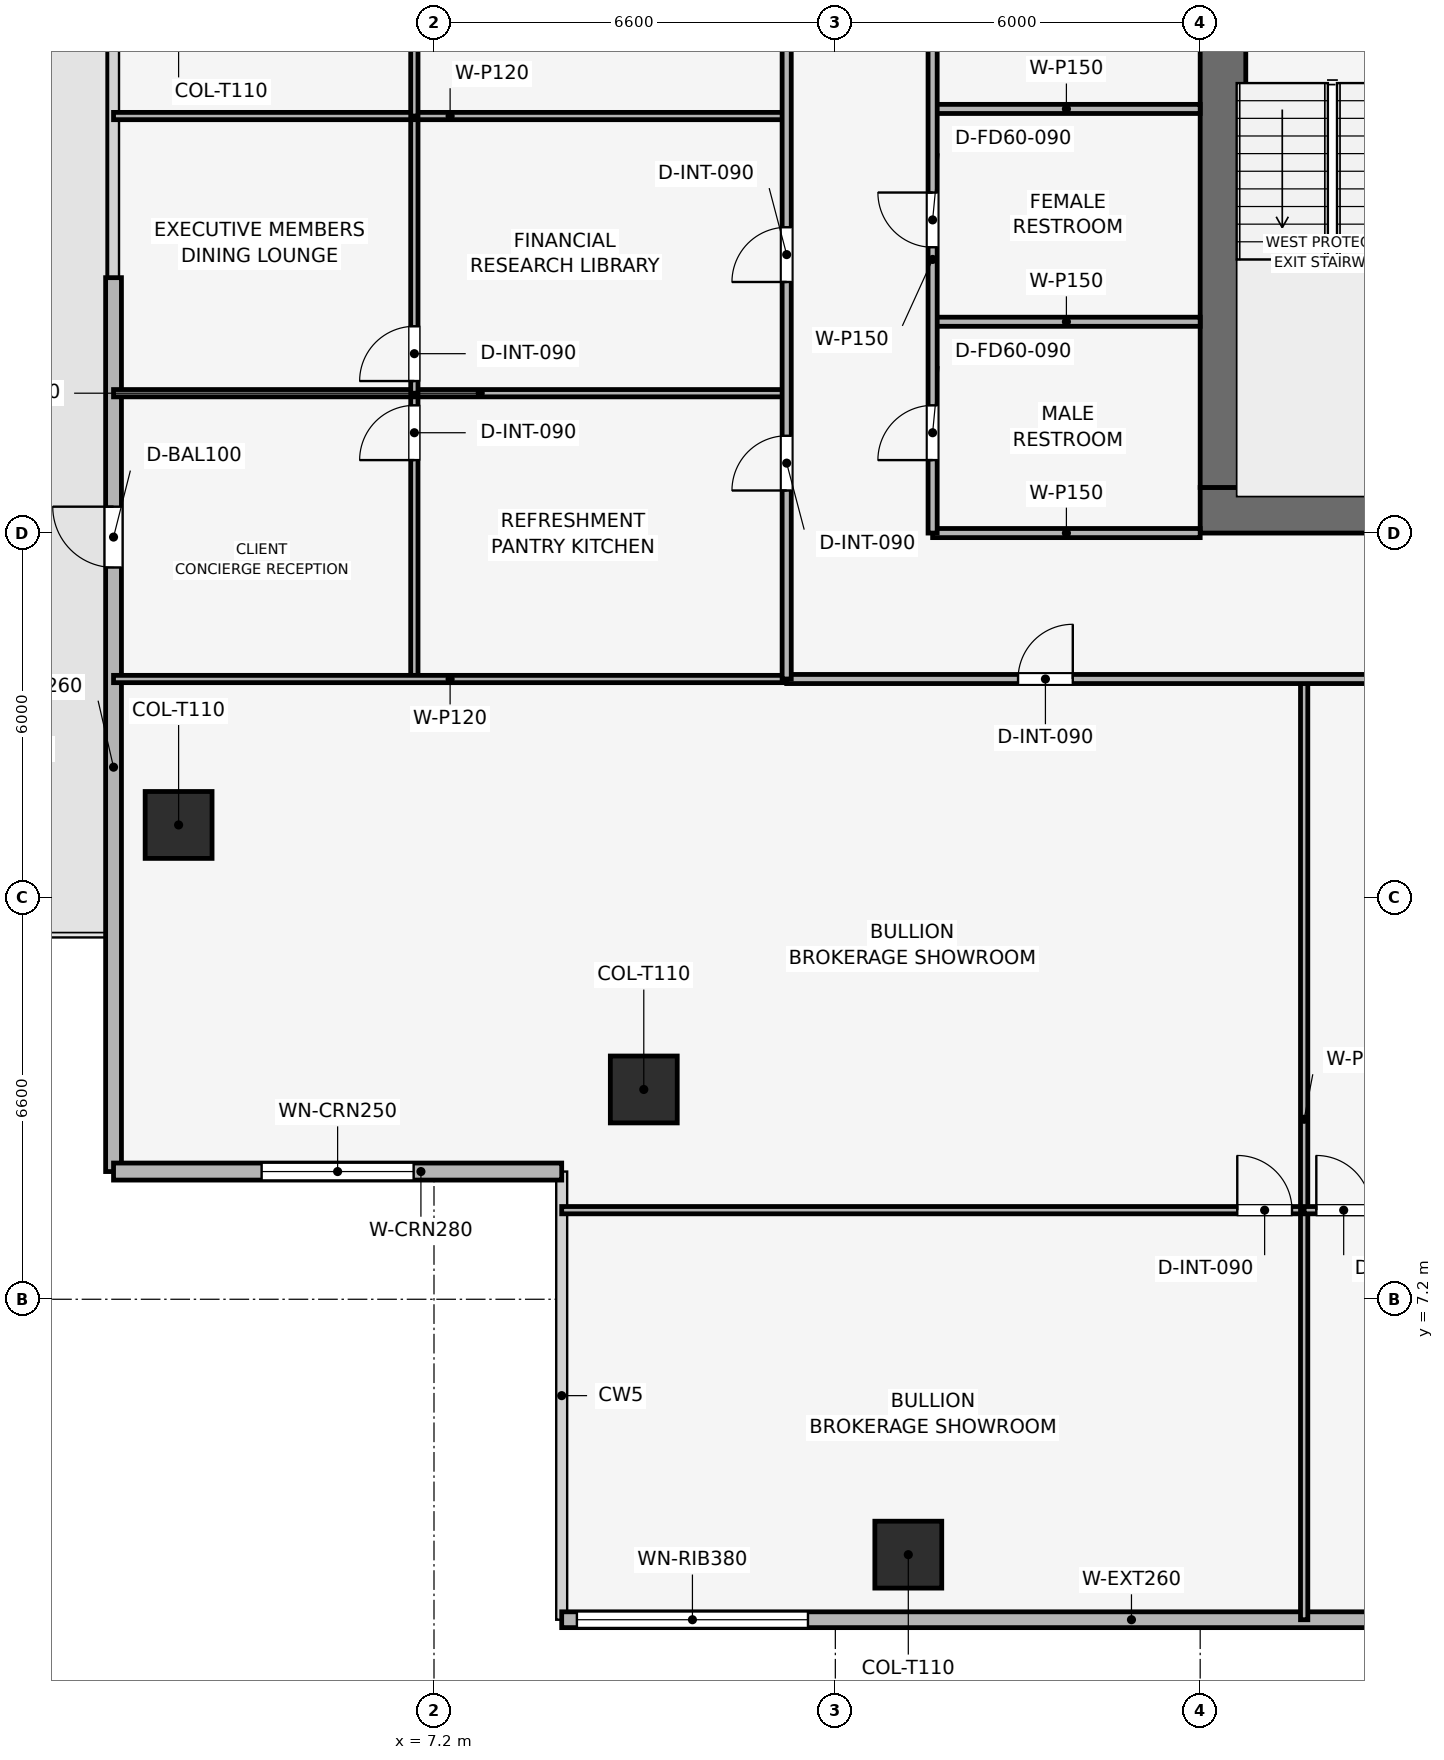
"""IFC4 building model, lengths in metres.
Left out: names, types, materials, properties, quantities, classifications, styles, units other than length and angle.
Written with IfcOpenShell. Run it as: python <this file> out.ifc"""

import sys

from ifc_helpers import new_model, si_unit, direction, frame, frame_2d, origin, origin_2d, place, context, subcontext, project, spatial, rectangle, extrude, element, fill, save


model = new_model("IFC4")
c1 = context("Model", 3, precision=1e-05, world=origin(), true_north=direction((0.0, 1.0)))
c2 = subcontext(c1, "Body", "Model", "MODEL_VIEW")
j1 = project(units=[si_unit("LENGTHUNIT", "METRE"), si_unit("PLANEANGLEUNIT", "RADIAN")], contexts=[c1])
p1 = place(None, origin())
s1 = spatial("IfcSite", under=j1, at=p1, CompositionType="ELEMENT")
p2 = place(p1, origin())
s2 = spatial("IfcBuilding", under=s1, at=p2, CompositionType="ELEMENT")
p3 = place(p2, frame((0.0, 0.0, 199.95)))
s3 = spatial("IfcBuildingStorey", under=s2, at=p3, CompositionType="ELEMENT", Elevation=199.95)
p4 = place(p3, frame((19.8, 20.175, 0.0), z_axis=(0.0, 0.0, 1.0), x_axis=(1.0, 0.0, 0.0)))
e1 = element("IfcWall", 1, at=p4, inside=s3, PredefinedType="SHEAR", context=c2, shape_type="SweptSolid", body=[
    extrude(rectangle(XDim=18.0, YDim=0.75, at=frame_2d((9.0, 0.0))), origin(), (0.0, 0.0, 1.0), 3.75),
])
p5 = place(p4, frame((8.4, 0.0, 0.0)))
e2 = element("IfcOpeningElement", 2, at=p5, cuts=e1, PredefinedType="OPENING", context=c2, shape_type="SweptSolid", body=[
    extrude(rectangle(XDim=1.2, YDim=2.2, at=frame_2d((0.6, 1.1))), frame((0.0, 0.385, 0.0), z_axis=(0.0, -1.0, 0.0), x_axis=(1.0, 0.0, 0.0)), (0.0, 0.0, 1.0), 0.77),
])
p6 = place(p3, frame((20.175, 20.55, 0.0), z_axis=(0.0, 0.0, 1.0), x_axis=(0.0, 1.0, 0.0)))
e3 = element("IfcWall", 3, at=p6, inside=s3, PredefinedType="SHEAR", context=c2, shape_type="SweptSolid", body=[
    extrude(rectangle(XDim=16.5, YDim=0.75, at=frame_2d((8.25, 0.0))), origin(), (0.0, 0.0, 1.0), 3.75),
])
p7 = place(p6, frame((10.25, 0.0, 0.0)))
e4 = element("IfcOpeningElement", 4, at=p7, cuts=e3, PredefinedType="OPENING", context=c2, shape_type="SweptSolid", body=[
    extrude(rectangle(XDim=1.1, YDim=2.15, at=frame_2d((0.55, 1.075))), frame((0.0, 0.385, 0.0), z_axis=(0.0, -1.0, 0.0), x_axis=(1.0, 0.0, 0.0)), (0.0, 0.0, 1.0), 0.77),
])
for number, where, z_axis, x_axis in (
    (5, (15.0, 3.0, 0.003), (0.0, 0.0, 1.0), (1.0, 0.0, 0.0)),
    (6, (3.0, 15.0, 0.003), (0.0, 0.0, 1.0), (1.0, 0.0, 0.0)),
    (7, (10.65, 10.65, 0.003), (0.0, 0.0, 1.0), (1.0, 0.0, 0.0)),
):
    element("IfcColumn", number, at=place(p3, frame(where, z_axis=z_axis, x_axis=x_axis)), inside=s3, PredefinedType="COLUMN", context=c2, shape_type="SweptSolid", body=[
        extrude(rectangle(XDim=1.1, YDim=1.1, at=origin_2d()), origin(), (0.0, 0.0, 1.0), 3.494),
    ])
p8 = place(p3, frame((24.0, 1.93, 0.0), z_axis=(0.0, 0.0, 1.0), x_axis=(-1.0, 0.0, 0.0)))
e8 = element("IfcWall", 8, at=p8, inside=s3, PredefinedType="SOLIDWALL", context=c2, shape_type="SweptSolid", body=[
    extrude(rectangle(XDim=14.7, YDim=0.26, at=frame_2d((7.35, 0.0))), origin(), (0.0, 0.0, 1.0), 3.5),
])
p9 = place(p8, frame((10.65, 0.0, 0.9)))
e9 = element("IfcOpeningElement", 9, at=p9, cuts=e8, PredefinedType="OPENING", context=c2, shape_type="SweptSolid", body=[
    extrude(rectangle(XDim=3.8, YDim=1.9, at=frame_2d((1.9, 0.95))), frame((0.0, 0.14, 0.0), z_axis=(0.0, -1.0, 0.0), x_axis=(1.0, 0.0, 0.0)), (0.0, 0.0, 1.0), 0.28),
])
p10 = place(p3, frame((1.93, 9.3, 0.0), z_axis=(0.0, 0.0, 1.0), x_axis=(0.0, 1.0, 0.0)))
e10 = element("IfcWall", 10, at=p10, inside=s3, PredefinedType="SOLIDWALL", context=c2, shape_type="SweptSolid", body=[
    extrude(rectangle(XDim=14.7, YDim=0.26, at=frame_2d((7.35, 0.0))), origin(), (0.0, 0.0, 1.0), 3.5),
])
p11 = place(p10, frame((9.934, 0.0, 0.0)))
e11 = element("IfcOpeningElement", 11, at=p11, cuts=e10, PredefinedType="OPENING", context=c2, shape_type="SweptSolid", body=[
    extrude(rectangle(XDim=1.0, YDim=2.2, at=frame_2d((0.5, 1.1))), frame((0.0, 0.14, 0.0), z_axis=(0.0, -1.0, 0.0), x_axis=(1.0, 0.0, 0.0)), (0.0, 0.0, 1.0), 0.28),
])
p12 = place(p3, frame((9.3, 9.3, 0.0), z_axis=(0.0, 0.0, 1.0), x_axis=(-1.0, 0.0, 0.0)))
e12 = element("IfcWall", 12, at=p12, inside=s3, PredefinedType="SOLIDWALL", context=c2, shape_type="SweptSolid", body=[
    extrude(rectangle(XDim=7.37, YDim=0.28, at=frame_2d((3.685, 0.0))), origin(), (0.0, 0.0, 1.0), 3.5),
])
p13 = place(p12, frame((2.435, 0.0, 0.9)))
e13 = element("IfcOpeningElement", 13, at=p13, cuts=e12, PredefinedType="OPENING", context=c2, shape_type="SweptSolid", body=[
    extrude(rectangle(XDim=2.5, YDim=1.9, at=frame_2d((1.25, 0.95))), frame((0.0, 0.15, 0.0), z_axis=(0.0, -1.0, 0.0), x_axis=(1.0, 0.0, 0.0)), (0.0, 0.0, 1.0), 0.3),
])
p14 = place(p3, frame((15.4, 19.8, 0.0), z_axis=(0.0, 0.0, 1.0), x_axis=(1.0, 0.0, 0.0)))
e14 = element("IfcWall", 14, at=p14, inside=s3, PredefinedType="PARTITIONING", context=c2, shape_type="SweptSolid", body=[
    extrude(rectangle(XDim=4.4, YDim=0.15, at=frame_2d((2.2, 0.0))), origin(), (0.0, 0.0, 1.0), 3.035),
])
for number, where, z_axis, x_axis in (
    (15, (15.4, 23.275, 0.0), (0.0, 0.0, 1.0), (1.0, 0.0, 0.0)),
    (16, (15.4, 26.775, 0.0), (0.0, 0.0, 1.0), (1.0, 0.0, 0.0)),
):
    element("IfcWall", number, at=place(p3, frame(where, z_axis=z_axis, x_axis=x_axis)), inside=s3, PredefinedType="PARTITIONING", context=c2, shape_type="SweptSolid", body=[
        extrude(rectangle(XDim=4.4, YDim=0.15, at=frame_2d((2.2, 0.0))), origin(), (0.0, 0.0, 1.0), 3.5),
    ])
p15 = place(p3, frame((15.4, 19.8, 0.0), z_axis=(0.0, 0.0, 1.0), x_axis=(0.0, 1.0, 0.0)))
e17 = element("IfcWall", 17, at=p15, inside=s3, PredefinedType="PARTITIONING", context=c2, shape_type="SweptSolid", body=[
    extrude(rectangle(XDim=10.35, YDim=0.15, at=frame_2d((5.175, 0.0))), origin(), (0.0, 0.0, 1.0), 3.035),
])
p16 = place(p15, frame((1.2, 0.0, 0.0)))
e18 = element("IfcOpeningElement", 18, at=p16, cuts=e17, PredefinedType="OPENING", context=c2, shape_type="SweptSolid", body=[
    extrude(rectangle(XDim=0.9, YDim=2.1, at=frame_2d((0.45, 1.05))), frame((0.0, 0.085, 0.0), z_axis=(0.0, -1.0, 0.0), x_axis=(1.0, 0.0, 0.0)), (0.0, 0.0, 1.0), 0.17),
])
p17 = place(p15, frame((4.7, 0.0, 0.0)))
e19 = element("IfcOpeningElement", 19, at=p17, cuts=e17, PredefinedType="OPENING", context=c2, shape_type="SweptSolid", body=[
    extrude(rectangle(XDim=0.9, YDim=2.1, at=frame_2d((0.45, 1.05))), frame((0.0, 0.085, 0.0), z_axis=(0.0, -1.0, 0.0), x_axis=(1.0, 0.0, 0.0)), (0.0, 0.0, 1.0), 0.17),
])
p18 = place(p15, frame((8.1, 0.0, 0.0)))
e20 = element("IfcOpeningElement", 20, at=p18, cuts=e17, PredefinedType="OPENING", context=c2, shape_type="SweptSolid", body=[
    extrude(rectangle(XDim=0.95, YDim=2.1, at=frame_2d((0.475, 1.05))), frame((0.0, 0.085, 0.0), z_axis=(0.0, -1.0, 0.0), x_axis=(1.0, 0.0, 0.0)), (0.0, 0.0, 1.0), 0.17),
])
p19 = place(p3, frame((9.3, 8.665, 0.0), z_axis=(0.0, 0.0, 1.0), x_axis=(1.0, 0.0, 0.0)))
e21 = element("IfcWall", 21, at=p19, inside=s3, PredefinedType="PARTITIONING", context=c2, shape_type="SweptSolid", body=[
    extrude(rectangle(XDim=12.21, YDim=0.12, at=frame_2d((6.105, 0.0))), origin(), (0.0, 0.0, 1.0), 2.885),
])
p20 = place(p19, frame((11.11, 0.0, 0.0)))
e22 = element("IfcOpeningElement", 22, at=p20, cuts=e21, PredefinedType="OPENING", context=c2, shape_type="SweptSolid", body=[
    extrude(rectangle(XDim=0.9, YDim=2.1, at=frame_2d((0.45, 1.05))), frame((0.0, 0.07, 0.0), z_axis=(0.0, -1.0, 0.0), x_axis=(1.0, 0.0, 0.0)), (0.0, 0.0, 1.0), 0.14),
])
p21 = place(p3, frame((21.51, 1.93, 0.0), z_axis=(0.0, 0.0, 1.0), x_axis=(0.0, 1.0, 0.0)))
e23 = element("IfcWall", 23, at=p21, inside=s3, PredefinedType="PARTITIONING", context=c2, shape_type="SweptSolid", body=[
    extrude(rectangle(XDim=15.47, YDim=0.12, at=frame_2d((7.735, 0.0))), origin(), (0.0, 0.0, 1.0), 2.885),
])
p22 = place(p3, frame((21.51, 8.665, 0.0), z_axis=(0.0, 0.0, 1.0), x_axis=(1.0, 0.0, 0.0)))
e24 = element("IfcWall", 24, at=p22, inside=s3, PredefinedType="PARTITIONING", context=c2, shape_type="SweptSolid", body=[
    extrude(rectangle(XDim=26.79, YDim=0.12, at=frame_2d((13.395, 0.0))), origin(), (0.0, 0.0, 1.0), 2.885),
])
p23 = place(p22, frame((0.2, 0.0, 0.0)))
e25 = element("IfcOpeningElement", 25, at=p23, cuts=e24, PredefinedType="OPENING", context=c2, shape_type="SweptSolid", body=[
    extrude(rectangle(XDim=0.9, YDim=2.1, at=frame_2d((0.45, 1.05))), frame((0.0, 0.07, 0.0), z_axis=(0.0, -1.0, 0.0), x_axis=(1.0, 0.0, 0.0)), (0.0, 0.0, 1.0), 0.14),
])
p24 = place(p3, frame((6.877, 17.4, 0.0), z_axis=(0.0, 0.0, 1.0), x_axis=(0.0, 1.0, 0.0)))
e26 = element("IfcWall", 26, at=p24, inside=s3, PredefinedType="PARTITIONING", context=c2, shape_type="SweptSolid", body=[
    extrude(rectangle(XDim=4.7, YDim=0.12, at=frame_2d((2.35, 0.0))), origin(), (0.0, 0.0, 1.0), 3.035),
])
p25 = place(p24, frame((3.6, 0.0, 0.0)))
e27 = element("IfcOpeningElement", 27, at=p25, cuts=e26, PredefinedType="OPENING", context=c2, shape_type="SweptSolid", body=[
    extrude(rectangle(XDim=0.9, YDim=2.1, at=frame_2d((0.45, 1.05))), frame((0.0, 0.07, 0.0), z_axis=(0.0, -1.0, 0.0), x_axis=(1.0, 0.0, 0.0)), (0.0, 0.0, 1.0), 0.14),
])
p26 = place(p3, frame((1.93, 22.1, 0.0), z_axis=(0.0, 0.0, 1.0), x_axis=(1.0, 0.0, 0.0)))
e28 = element("IfcWall", 28, at=p26, inside=s3, PredefinedType="PARTITIONING", context=c2, shape_type="SweptSolid", body=[
    extrude(rectangle(XDim=11.07, YDim=0.12, at=frame_2d((5.535, 0.0))), origin(), (0.0, 0.0, 1.0), 2.885),
])
p27 = place(p3, frame((6.877, 22.1, 0.0), z_axis=(0.0, 0.0, 1.0), x_axis=(0.0, 1.0, 0.0)))
e29 = element("IfcWall", 29, at=p27, inside=s3, PredefinedType="PARTITIONING", context=c2, shape_type="SweptSolid", body=[
    extrude(rectangle(XDim=4.558, YDim=0.12, at=frame_2d((2.279, 0.0))), origin(), (0.0, 0.0, 1.0), 3.5),
])
p28 = place(p27, frame((0.2, 0.0, 0.0)))
e30 = element("IfcOpeningElement", 30, at=p28, cuts=e29, PredefinedType="OPENING", context=c2, shape_type="SweptSolid", body=[
    extrude(rectangle(XDim=0.9, YDim=2.1, at=frame_2d((0.45, 1.05))), frame((0.0, 0.07, 0.0), z_axis=(0.0, -1.0, 0.0), x_axis=(1.0, 0.0, 0.0)), (0.0, 0.0, 1.0), 0.14),
])
p29 = place(p3, frame((1.93, 26.658, 0.0), z_axis=(0.0, 0.0, 1.0), x_axis=(1.0, 0.0, 0.0)))
e31 = element("IfcWall", 31, at=p29, inside=s3, PredefinedType="PARTITIONING", context=c2, shape_type="SweptSolid", body=[
    extrude(rectangle(XDim=11.07, YDim=0.12, at=frame_2d((5.535, 0.0))), origin(), (0.0, 0.0, 1.0), 2.885),
])
p30 = place(p3, frame((6.877, 26.658, 0.0), z_axis=(0.0, 0.0, 1.0), x_axis=(0.0, 1.0, 0.0)))
e32 = element("IfcWall", 32, at=p30, inside=s3, PredefinedType="PARTITIONING", context=c2, shape_type="SweptSolid", body=[
    extrude(rectangle(XDim=4.297, YDim=0.12, at=frame_2d((2.148, 0.0))), origin(), (0.0, 0.0, 1.0), 3.035),
])
p31 = place(p30, frame((3.197, 0.0, 0.0)))
e33 = element("IfcOpeningElement", 33, at=p31, cuts=e32, PredefinedType="OPENING", context=c2, shape_type="SweptSolid", body=[
    extrude(rectangle(XDim=0.9, YDim=2.1, at=frame_2d((0.45, 1.05))), frame((0.0, 0.07, 0.0), z_axis=(0.0, -1.0, 0.0), x_axis=(1.0, 0.0, 0.0)), (0.0, 0.0, 1.0), 0.14),
])
p32 = place(p3, frame((1.93, 17.4, 0.0), z_axis=(0.0, 0.0, 1.0), x_axis=(1.0, 0.0, 0.0)))
e34 = element("IfcWall", 34, at=p32, inside=s3, PredefinedType="PARTITIONING", context=c2, shape_type="SweptSolid", body=[
    extrude(rectangle(XDim=11.07, YDim=0.12, at=frame_2d((5.535, 0.0))), origin(), (0.0, 0.0, 1.0), 2.885),
])
p33 = place(p3, frame((13.0, 17.4, 0.0), z_axis=(0.0, 0.0, 1.0), x_axis=(1.0, 0.0, 0.0)))
e35 = element("IfcWall", 35, at=p33, inside=s3, PredefinedType="PARTITIONING", context=c2, shape_type="SweptSolid", body=[
    extrude(rectangle(XDim=31.6, YDim=0.15, at=frame_2d((15.8, 0.0))), origin(), (0.0, 0.0, 1.0), 3.035),
])
p34 = place(p33, frame((3.805, 0.0, 0.0)))
e36 = element("IfcOpeningElement", 36, at=p34, cuts=e35, PredefinedType="OPENING", context=c2, shape_type="SweptSolid", body=[
    extrude(rectangle(XDim=0.9, YDim=2.1, at=frame_2d((0.45, 1.05))), frame((0.0, 0.085, 0.0), z_axis=(0.0, -1.0, 0.0), x_axis=(1.0, 0.0, 0.0)), (0.0, 0.0, 1.0), 0.17),
])
p35 = place(p33, frame((19.605, 0.0, 0.0)))
e37 = element("IfcOpeningElement", 37, at=p35, cuts=e35, PredefinedType="OPENING", context=c2, shape_type="SweptSolid", body=[
    extrude(rectangle(XDim=0.9, YDim=2.1, at=frame_2d((0.45, 1.05))), frame((0.0, 0.085, 0.0), z_axis=(0.0, -1.0, 0.0), x_axis=(1.0, 0.0, 0.0)), (0.0, 0.0, 1.0), 0.17),
])
p36 = place(p3, frame((13.0, 17.4, 0.0), z_axis=(0.0, 0.0, 1.0), x_axis=(0.0, 1.0, 0.0)))
e38 = element("IfcWall", 38, at=p36, inside=s3, PredefinedType="PARTITIONING", context=c2, shape_type="SweptSolid", body=[
    extrude(rectangle(XDim=22.8, YDim=0.15, at=frame_2d((11.4, 0.0))), origin(), (0.0, 0.0, 1.0), 3.035),
])
p37 = place(p36, frame((3.1, 0.0, 0.0)))
e39 = element("IfcOpeningElement", 39, at=p37, cuts=e38, PredefinedType="OPENING", context=c2, shape_type="SweptSolid", body=[
    extrude(rectangle(XDim=0.9, YDim=2.1, at=frame_2d((0.45, 1.05))), frame((0.0, 0.085, 0.0), z_axis=(0.0, -1.0, 0.0), x_axis=(1.0, 0.0, 0.0)), (0.0, 0.0, 1.0), 0.17),
])
p38 = place(p36, frame((6.529, 0.0, 0.0)))
e40 = element("IfcOpeningElement", 40, at=p38, cuts=e38, PredefinedType="OPENING", context=c2, shape_type="SweptSolid", body=[
    extrude(rectangle(XDim=0.9, YDim=2.1, at=frame_2d((0.45, 1.05))), frame((0.0, 0.085, 0.0), z_axis=(0.0, -1.0, 0.0), x_axis=(1.0, 0.0, 0.0)), (0.0, 0.0, 1.0), 0.17),
])
p39 = place(p36, frame((10.957, 0.0, 0.0)))
e41 = element("IfcOpeningElement", 41, at=p39, cuts=e38, PredefinedType="OPENING", context=c2, shape_type="SweptSolid", body=[
    extrude(rectangle(XDim=0.9, YDim=2.1, at=frame_2d((0.45, 1.05))), frame((0.0, 0.085, 0.0), z_axis=(0.0, -1.0, 0.0), x_axis=(1.0, 0.0, 0.0)), (0.0, 0.0, 1.0), 0.17),
])
p40 = place(p36, frame((16.527, 0.0, 0.0)))
e42 = element("IfcOpeningElement", 42, at=p40, cuts=e38, PredefinedType="OPENING", context=c2, shape_type="SweptSolid", body=[
    extrude(rectangle(XDim=0.9, YDim=2.1, at=frame_2d((0.45, 1.05))), frame((0.0, 0.085, 0.0), z_axis=(0.0, -1.0, 0.0), x_axis=(1.0, 0.0, 0.0)), (0.0, 0.0, 1.0), 0.17),
])
p41 = place(p9, origin())
e43 = element("IfcWindow", 43, at=p41, inside=s3, PartitioningType="SINGLE_PANEL", PredefinedType="WINDOW", context=c2, shape_type="SweptSolid", body=[
    extrude(rectangle(XDim=3.8, YDim=1.9, at=frame_2d((1.9, 0.95))), frame((0.0, 0.03, 0.0), z_axis=(0.0, -1.0, 0.0), x_axis=(1.0, 0.0, 0.0)), (0.0, 0.0, 1.0), 0.06),
])
fill(e9, e43)
p42 = place(p11, origin())
e44 = element("IfcDoor", 44, at=p42, inside=s3, OperationType="SINGLE_SWING_RIGHT", PredefinedType="DOOR", context=c2, shape_type="SweptSolid", body=[
    extrude(rectangle(XDim=1.0, YDim=2.2, at=frame_2d((0.5, 1.1))), frame((0.0, 0.025, 0.0), z_axis=(0.0, -1.0, 0.0), x_axis=(1.0, 0.0, 0.0)), (0.0, 0.0, 1.0), 0.05),
])
fill(e11, e44)
p43 = place(p13, origin())
e45 = element("IfcWindow", 45, at=p43, inside=s3, PartitioningType="SINGLE_PANEL", PredefinedType="WINDOW", context=c2, shape_type="SweptSolid", body=[
    extrude(rectangle(XDim=2.5, YDim=1.9, at=frame_2d((1.25, 0.95))), frame((0.0, 0.03, 0.0), z_axis=(0.0, -1.0, 0.0), x_axis=(1.0, 0.0, 0.0)), (0.0, 0.0, 1.0), 0.06),
])
fill(e13, e45)
p44 = place(p16, origin())
e46 = element("IfcDoor", 46, at=p44, inside=s3, OperationType="SINGLE_SWING_LEFT", PredefinedType="DOOR", context=c2, shape_type="SweptSolid", body=[
    extrude(rectangle(XDim=0.9, YDim=2.1, at=frame_2d((0.45, 1.05))), frame((0.0, 0.025, 0.0), z_axis=(0.0, -1.0, 0.0), x_axis=(1.0, 0.0, 0.0)), (0.0, 0.0, 1.0), 0.05),
])
fill(e18, e46)
p45 = place(p17, origin())
e47 = element("IfcDoor", 47, at=p45, inside=s3, OperationType="SINGLE_SWING_RIGHT", PredefinedType="DOOR", context=c2, shape_type="SweptSolid", body=[
    extrude(rectangle(XDim=0.9, YDim=2.1, at=frame_2d((0.45, 1.05))), frame((0.0, 0.025, 0.0), z_axis=(0.0, -1.0, 0.0), x_axis=(1.0, 0.0, 0.0)), (0.0, 0.0, 1.0), 0.05),
])
fill(e19, e47)
p46 = place(p20, origin())
e48 = element("IfcDoor", 48, at=p46, inside=s3, OperationType="SINGLE_SWING_LEFT", PredefinedType="DOOR", context=c2, shape_type="SweptSolid", body=[
    extrude(rectangle(XDim=0.9, YDim=2.1, at=frame_2d((0.45, 1.05))), frame((0.0, 0.025, 0.0), z_axis=(0.0, -1.0, 0.0), x_axis=(1.0, 0.0, 0.0)), (0.0, 0.0, 1.0), 0.05),
])
fill(e22, e48)
p47 = place(p23, origin())
e49 = element("IfcDoor", 49, at=p47, inside=s3, OperationType="SINGLE_SWING_LEFT", PredefinedType="DOOR", context=c2, shape_type="SweptSolid", body=[
    extrude(rectangle(XDim=0.9, YDim=2.1, at=frame_2d((0.45, 1.05))), frame((0.0, 0.025, 0.0), z_axis=(0.0, -1.0, 0.0), x_axis=(1.0, 0.0, 0.0)), (0.0, 0.0, 1.0), 0.05),
])
fill(e25, e49)
p48 = place(p25, origin())
e50 = element("IfcDoor", 50, at=p48, inside=s3, OperationType="SINGLE_SWING_LEFT", PredefinedType="DOOR", context=c2, shape_type="SweptSolid", body=[
    extrude(rectangle(XDim=0.9, YDim=2.1, at=frame_2d((0.45, 1.05))), frame((0.0, 0.025, 0.0), z_axis=(0.0, -1.0, 0.0), x_axis=(1.0, 0.0, 0.0)), (0.0, 0.0, 1.0), 0.05),
])
fill(e27, e50)
p49 = place(p28, origin())
e51 = element("IfcDoor", 51, at=p49, inside=s3, OperationType="SINGLE_SWING_LEFT", PredefinedType="DOOR", context=c2, shape_type="SweptSolid", body=[
    extrude(rectangle(XDim=0.9, YDim=2.1, at=frame_2d((0.45, 1.05))), frame((0.0, 0.025, 0.0), z_axis=(0.0, -1.0, 0.0), x_axis=(1.0, 0.0, 0.0)), (0.0, 0.0, 1.0), 0.05),
])
fill(e30, e51)
p50 = place(p34, origin())
e52 = element("IfcDoor", 52, at=p50, inside=s3, OperationType="SINGLE_SWING_RIGHT", PredefinedType="DOOR", context=c2, shape_type="SweptSolid", body=[
    extrude(rectangle(XDim=0.9, YDim=2.1, at=frame_2d((0.45, 1.05))), frame((0.0, 0.025, 0.0), z_axis=(0.0, -1.0, 0.0), x_axis=(1.0, 0.0, 0.0)), (0.0, 0.0, 1.0), 0.05),
])
fill(e36, e52)
p51 = place(p37, origin())
e53 = element("IfcDoor", 53, at=p51, inside=s3, OperationType="SINGLE_SWING_LEFT", PredefinedType="DOOR", context=c2, shape_type="SweptSolid", body=[
    extrude(rectangle(XDim=0.9, YDim=2.1, at=frame_2d((0.45, 1.05))), frame((0.0, 0.025, 0.0), z_axis=(0.0, -1.0, 0.0), x_axis=(1.0, 0.0, 0.0)), (0.0, 0.0, 1.0), 0.05),
])
fill(e39, e53)
p52 = place(p38, origin())
e54 = element("IfcDoor", 54, at=p52, inside=s3, OperationType="SINGLE_SWING_LEFT", PredefinedType="DOOR", context=c2, shape_type="SweptSolid", body=[
    extrude(rectangle(XDim=0.9, YDim=2.1, at=frame_2d((0.45, 1.05))), frame((0.0, 0.025, 0.0), z_axis=(0.0, -1.0, 0.0), x_axis=(1.0, 0.0, 0.0)), (0.0, 0.0, 1.0), 0.05),
])
fill(e40, e54)
save(model, sys.argv[1])
